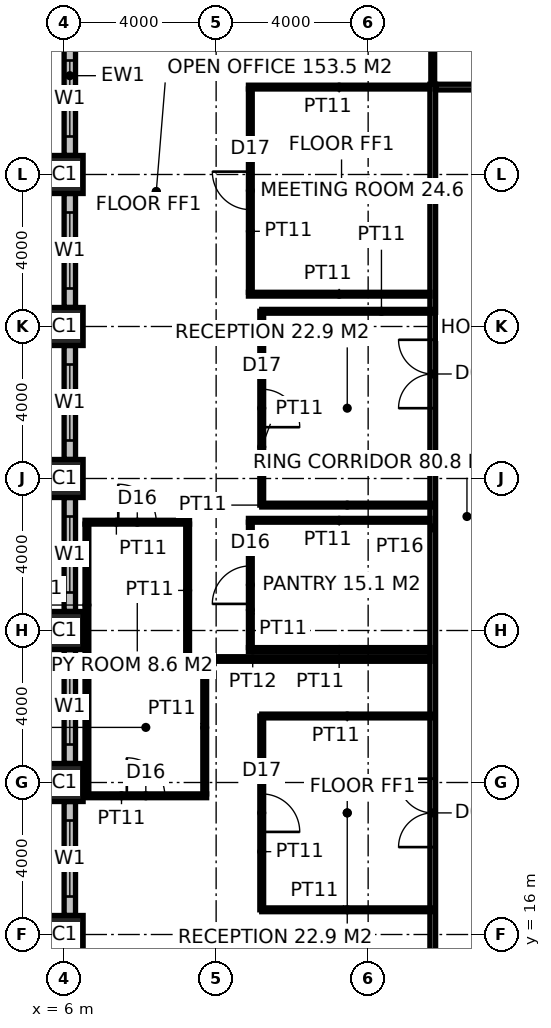
"""IFC4 building model, lengths in metres.
Left out: names, types, materials, properties, quantities, classifications, styles, units other than length and angle.
Written with IfcOpenShell. Run it as: python <this file> out.ifc"""

import sys

from ifc_helpers import new_model, si_unit, direction, frame, frame_2d, origin, origin_2d, place, context, subcontext, project, spatial, rectangle, hollow_rectangle, extrude, element, fill, save


model = new_model("IFC4")
c1 = context("Model", 3, precision=1e-05, world=origin(), true_north=direction((0.0, 1.0)))
c2 = subcontext(c1, "Body", "Model", "MODEL_VIEW")
j1 = project(units=[si_unit("LENGTHUNIT", "METRE"), si_unit("PLANEANGLEUNIT", "RADIAN")], contexts=[c1])
p1 = place(None, origin())
s1 = spatial("IfcSite", under=j1, at=p1, CompositionType="ELEMENT")
p2 = place(p1, origin())
s2 = spatial("IfcBuilding", under=s1, at=p2, CompositionType="ELEMENT")
p3 = place(p2, frame((0.0, 0.0, 286.2)))
s3 = spatial("IfcBuildingStorey", under=s2, at=p3, CompositionType="ELEMENT", Elevation=286.2)
for number, where, z_axis, x_axis in (
    (1, (6.0, 16.0, 0.0), (0.0, 0.0, 1.0), (1.0, 0.0, 0.0)),
    (2, (6.0, 20.0, 0.0), (0.0, 0.0, 1.0), (1.0, 0.0, 0.0)),
    (3, (6.0, 24.0, 0.0), (0.0, 0.0, 1.0), (1.0, 0.0, 0.0)),
    (4, (6.0, 28.0, 0.0), (0.0, 0.0, 1.0), (1.0, 0.0, 0.0)),
    (5, (6.0, 32.0, 0.0), (0.0, 0.0, 1.0), (1.0, 0.0, 0.0)),
    (6, (6.0, 36.0, 0.0), (0.0, 0.0, 1.0), (1.0, 0.0, 0.0)),
):
    element("IfcColumn", number, at=place(p3, frame(where, z_axis=z_axis, x_axis=x_axis)), inside=s3, PredefinedType="COLUMN", context=c2, shape_type="SweptSolid", body=[
        extrude(hollow_rectangle(XDim=1.0, YDim=1.0, WallThickness=0.1, at=origin_2d()), origin(), (0.0, 0.0, 1.0), 4.0),
    ])
p4 = place(p3, frame((15.7, 15.025, 0.0), z_axis=(0.0, 0.0, 1.0), x_axis=(0.0, 1.0, 0.0)))
e7 = element("IfcWall", 7, at=p4, inside=s3, PredefinedType="PARTITIONING", context=c2, shape_type="SweptSolid", body=[
    extrude(rectangle(XDim=23.35, YDim=0.15, at=frame_2d((11.675, 0.0))), origin(), (0.0, 0.0, 1.0), 3.85),
])
p5 = place(p4, frame((3.275, 0.0, 0.0)))
e8 = element("IfcOpeningElement", 8, at=p5, cuts=e7, PredefinedType="OPENING", context=c2, shape_type="SweptSolid", body=[
    extrude(rectangle(XDim=1.8, YDim=2.4, at=frame_2d((0.9, 1.2))), frame((0.0, 0.085, 0.0), z_axis=(0.0, -1.0, 0.0), x_axis=(1.0, 0.0, 0.0)), (0.0, 0.0, 1.0), 0.17),
])
p6 = place(p4, frame((14.825, 0.0, 0.0)))
e9 = element("IfcOpeningElement", 9, at=p6, cuts=e7, PredefinedType="OPENING", context=c2, shape_type="SweptSolid", body=[
    extrude(rectangle(XDim=1.8, YDim=2.4, at=frame_2d((0.9, 1.2))), frame((0.0, 0.085, 0.0), z_axis=(0.0, -1.0, 0.0), x_axis=(1.0, 0.0, 0.0)), (0.0, 0.0, 1.0), 0.17),
])
p7 = place(p3, frame((15.775, 38.3, 0.0), z_axis=(0.0, 0.0, 1.0), x_axis=(1.0, 0.0, 0.0)))
e10 = element("IfcWall", 10, at=p7, inside=s3, PredefinedType="PARTITIONING", context=c2, shape_type="SweptSolid", body=[
    extrude(rectangle(XDim=22.65, YDim=0.15, at=frame_2d((11.325, 0.0))), origin(), (0.0, 0.0, 1.0), 3.85),
])
p8 = place(p7, frame((7.975, 0.0, 0.0)))
e11 = element("IfcOpeningElement", 11, at=p8, cuts=e10, PredefinedType="OPENING", context=c2, shape_type="SweptSolid", body=[
    extrude(rectangle(XDim=0.9, YDim=2.1, at=frame_2d((0.45, 1.05))), frame((0.0, 0.085, 0.0), z_axis=(0.0, -1.0, 0.0), x_axis=(1.0, 0.0, 0.0)), (0.0, 0.0, 1.0), 0.17),
])
p9 = place(p7, frame((11.725, 0.0, 0.0)))
e12 = element("IfcOpeningElement", 12, at=p9, cuts=e10, PredefinedType="OPENING", context=c2, shape_type="SweptSolid", body=[
    extrude(rectangle(XDim=1.0, YDim=2.1, at=frame_2d((0.5, 1.05))), frame((0.0, 0.085, 0.0), z_axis=(0.0, -1.0, 0.0), x_axis=(1.0, 0.0, 0.0)), (0.0, 0.0, 1.0), 0.17),
])
p10 = place(p7, frame((15.575, 0.0, 0.0)))
e13 = element("IfcOpeningElement", 13, at=p10, cuts=e10, PredefinedType="OPENING", context=c2, shape_type="SweptSolid", body=[
    extrude(rectangle(XDim=0.9, YDim=2.1, at=frame_2d((0.45, 1.05))), frame((0.0, 0.085, 0.0), z_axis=(0.0, -1.0, 0.0), x_axis=(1.0, 0.0, 0.0)), (0.0, 0.0, 1.0), 0.17),
])
p11 = place(p3, frame((6.3, 23.25, 0.0), z_axis=(0.0, 0.0, 1.0), x_axis=(1.0, 0.0, 0.0)))
e14 = element("IfcWall", 14, at=p11, inside=s3, PredefinedType="PARTITIONING", context=c2, shape_type="SweptSolid", body=[
    extrude(rectangle(XDim=9.325, YDim=0.12, at=frame_2d((4.663, 0.0))), origin(), (0.0, 0.0, 1.0), 3.85),
])
p12 = place(p3, frame((6.55, 19.65, 0.0), z_axis=(0.0, 0.0, 1.0), x_axis=(1.0, 0.0, 0.0)))
e15 = element("IfcWall", 15, at=p12, inside=s3, PredefinedType="PARTITIONING", context=c2, shape_type="SweptSolid", body=[
    extrude(rectangle(XDim=3.2, YDim=0.1, at=frame_2d((1.6, 0.0))), origin(), (0.0, 0.0, 1.0), 2.85),
])
p13 = place(p12, frame((1.1, 0.0, 0.0)))
e16 = element("IfcOpeningElement", 16, at=p13, cuts=e15, PredefinedType="OPENING", context=c2, shape_type="SweptSolid", body=[
    extrude(rectangle(XDim=1.0, YDim=2.2, at=frame_2d((0.5, 1.1))), frame((0.0, 0.06, 0.0), z_axis=(0.0, -1.0, 0.0), x_axis=(1.0, 0.0, 0.0)), (0.0, 0.0, 1.0), 0.12),
])
p14 = place(p3, frame((10.85, 23.5, 0.0), z_axis=(0.0, 0.0, 1.0), x_axis=(1.0, 0.0, 0.0)))
e17 = element("IfcWall", 17, at=p14, inside=s3, PredefinedType="PARTITIONING", context=c2, shape_type="SweptSolid", body=[
    extrude(rectangle(XDim=4.775, YDim=0.1, at=frame_2d((2.387, 0.0))), origin(), (0.0, 0.0, 1.0), 3.85),
])
p15 = place(p3, frame((6.55, 26.85, 0.0), z_axis=(0.0, 0.0, 1.0), x_axis=(1.0, 0.0, 0.0)))
e18 = element("IfcWall", 18, at=p15, inside=s3, PredefinedType="PARTITIONING", context=c2, shape_type="SweptSolid", body=[
    extrude(rectangle(XDim=2.75, YDim=0.1, at=frame_2d((1.375, 0.0))), origin(), (0.0, 0.0, 1.0), 3.85),
])
p16 = place(p15, frame((0.875, 0.0, 0.0)))
e19 = element("IfcOpeningElement", 19, at=p16, cuts=e18, PredefinedType="OPENING", context=c2, shape_type="SweptSolid", body=[
    extrude(rectangle(XDim=1.0, YDim=2.2, at=frame_2d((0.5, 1.1))), frame((0.0, 0.06, 0.0), z_axis=(0.0, -1.0, 0.0), x_axis=(1.0, 0.0, 0.0)), (0.0, 0.0, 1.0), 0.12),
])
for number, where, z_axis, x_axis in (
    (20, (10.85, 26.9, 0.0), (0.0, 0.0, 1.0), (1.0, 0.0, 0.0)),
    (21, (10.85, 32.85, 0.0), (0.0, 0.0, 1.0), (1.0, 0.0, 0.0)),
    (22, (10.85, 38.3, 0.0), (0.0, 0.0, 1.0), (1.0, 0.0, 0.0)),
):
    element("IfcWall", number, at=place(p3, frame(where, z_axis=z_axis, x_axis=x_axis)), inside=s3, PredefinedType="PARTITIONING", context=c2, shape_type="SweptSolid", body=[
        extrude(rectangle(XDim=4.775, YDim=0.1, at=frame_2d((2.387, 0.0))), origin(), (0.0, 0.0, 1.0), 3.85),
    ])
p17 = place(p3, frame((6.6, 19.7, 0.0), z_axis=(0.0, 0.0, 1.0), x_axis=(0.0, 1.0, 0.0)))
e23 = element("IfcWall", 23, at=p17, inside=s3, PredefinedType="PARTITIONING", context=c2, shape_type="SweptSolid", body=[
    extrude(rectangle(XDim=7.1, YDim=0.1, at=frame_2d((3.55, 0.0))), origin(), (0.0, 0.0, 1.0), 3.85),
])
for number, where, z_axis, x_axis in (
    (24, (9.25, 23.31, 0.0), (0.0, 0.0, 1.0), (0.0, 1.0, 0.0)),
    (25, (9.7, 19.7, 0.0), (0.0, 0.0, 1.0), (0.0, 1.0, 0.0)),
):
    element("IfcWall", number, at=place(p3, frame(where, z_axis=z_axis, x_axis=x_axis)), inside=s3, PredefinedType="PARTITIONING", context=c2, shape_type="SweptSolid", body=[
        extrude(rectangle(XDim=3.49, YDim=0.1, at=frame_2d((1.745, 0.0))), origin(), (0.0, 0.0, 1.0), 3.85),
    ])
p18 = place(p3, frame((10.9, 23.55, 0.0), z_axis=(0.0, 0.0, 1.0), x_axis=(0.0, 1.0, 0.0)))
e26 = element("IfcWall", 26, at=p18, inside=s3, PredefinedType="PARTITIONING", context=c2, shape_type="SweptSolid", body=[
    extrude(rectangle(XDim=3.3, YDim=0.1, at=frame_2d((1.65, 0.0))), origin(), (0.0, 0.0, 1.0), 3.85),
])
p19 = place(p18, frame((1.15, 0.0, 0.0)))
e27 = element("IfcOpeningElement", 27, at=p19, cuts=e26, PredefinedType="OPENING", context=c2, shape_type="SweptSolid", body=[
    extrude(rectangle(XDim=1.0, YDim=2.2, at=frame_2d((0.5, 1.1))), frame((0.0, 0.06, 0.0), z_axis=(0.0, -1.0, 0.0), x_axis=(1.0, 0.0, 0.0)), (0.0, 0.0, 1.0), 0.12),
])
p20 = place(p3, frame((10.9, 32.9, 0.0), z_axis=(0.0, 0.0, 1.0), x_axis=(0.0, 1.0, 0.0)))
e28 = element("IfcWall", 28, at=p20, inside=s3, PredefinedType="PARTITIONING", context=c2, shape_type="SweptSolid", body=[
    extrude(rectangle(XDim=5.35, YDim=0.1, at=frame_2d((2.675, 0.0))), origin(), (0.0, 0.0, 1.0), 3.85),
])
p21 = place(p20, frame((2.175, 0.0, 0.0)))
e29 = element("IfcOpeningElement", 29, at=p21, cuts=e28, PredefinedType="OPENING", context=c2, shape_type="SweptSolid", body=[
    extrude(rectangle(XDim=1.0, YDim=2.2, at=frame_2d((0.5, 1.1))), frame((0.0, 0.06, 0.0), z_axis=(0.0, -1.0, 0.0), x_axis=(1.0, 0.0, 0.0)), (0.0, 0.0, 1.0), 0.12),
])
p22 = place(p3, frame((15.7, 38.375, 0.0), z_axis=(0.0, 0.0, 1.0), x_axis=(0.0, 1.0, 0.0)))
e30 = element("IfcWall", 30, at=p22, inside=s3, PredefinedType="PARTITIONING", context=c2, shape_type="SweptSolid", body=[
    extrude(rectangle(XDim=2.875, YDim=0.1, at=frame_2d((1.438, 0.0))), origin(), (0.0, 0.0, 1.0), 3.85),
])
p23 = place(p3, frame((15.7, 21.75, 0.0), z_axis=(0.0, 0.0, 1.0), x_axis=(-1.0, 0.0, 0.0)))
e31 = element("IfcWall", 31, at=p23, inside=s3, PredefinedType="PARTITIONING", context=c2, shape_type="SweptSolid", body=[
    extrude(rectangle(XDim=4.5, YDim=0.1, at=frame_2d((2.25, 0.0))), origin(), (0.0, 0.0, 1.0), 3.85),
])
p24 = place(p3, frame((11.2, 21.75, 0.0), z_axis=(0.0, 0.0, 1.0), x_axis=(0.0, -1.0, 0.0)))
e32 = element("IfcWall", 32, at=p24, inside=s3, PredefinedType="PARTITIONING", context=c2, shape_type="SweptSolid", body=[
    extrude(rectangle(XDim=5.1, YDim=0.1, at=frame_2d((2.55, 0.0))), origin(), (0.0, 0.0, 1.0), 3.85),
])
p25 = place(p24, frame((2.05, 0.0, 0.0)))
e33 = element("IfcOpeningElement", 33, at=p25, cuts=e32, PredefinedType="OPENING", context=c2, shape_type="SweptSolid", body=[
    extrude(rectangle(XDim=1.0, YDim=2.2, at=frame_2d((0.5, 1.1))), frame((0.0, 0.06, 0.0), z_axis=(0.0, -1.0, 0.0), x_axis=(1.0, 0.0, 0.0)), (0.0, 0.0, 1.0), 0.12),
])
for number, where, z_axis, x_axis in (
    (34, (11.2, 16.65, 0.0), (0.0, 0.0, 1.0), (1.0, 0.0, 0.0)),
    (35, (15.7, 32.4, 0.0), (0.0, 0.0, 1.0), (-1.0, 0.0, 0.0)),
):
    element("IfcWall", number, at=place(p3, frame(where, z_axis=z_axis, x_axis=x_axis)), inside=s3, PredefinedType="PARTITIONING", context=c2, shape_type="SweptSolid", body=[
        extrude(rectangle(XDim=4.5, YDim=0.1, at=frame_2d((2.25, 0.0))), origin(), (0.0, 0.0, 1.0), 3.85),
    ])
p26 = place(p3, frame((11.2, 32.4, 0.0), z_axis=(0.0, 0.0, 1.0), x_axis=(0.0, -1.0, 0.0)))
e36 = element("IfcWall", 36, at=p26, inside=s3, PredefinedType="PARTITIONING", context=c2, shape_type="SweptSolid", body=[
    extrude(rectangle(XDim=5.1, YDim=0.1, at=frame_2d((2.55, 0.0))), origin(), (0.0, 0.0, 1.0), 3.85),
])
p27 = place(p26, frame((2.05, 0.0, 0.0)))
e37 = element("IfcOpeningElement", 37, at=p27, cuts=e36, PredefinedType="OPENING", context=c2, shape_type="SweptSolid", body=[
    extrude(rectangle(XDim=1.0, YDim=2.2, at=frame_2d((0.5, 1.1))), frame((0.0, 0.06, 0.0), z_axis=(0.0, -1.0, 0.0), x_axis=(1.0, 0.0, 0.0)), (0.0, 0.0, 1.0), 0.12),
])
p28 = place(p3, frame((11.2, 27.3, 0.0), z_axis=(0.0, 0.0, 1.0), x_axis=(1.0, 0.0, 0.0)))
e38 = element("IfcWall", 38, at=p28, inside=s3, PredefinedType="PARTITIONING", context=c2, shape_type="SweptSolid", body=[
    extrude(rectangle(XDim=4.5, YDim=0.1, at=frame_2d((2.25, 0.0))), origin(), (0.0, 0.0, 1.0), 3.85),
])
p29 = place(p3, frame((6.15, 19.5, 0.0), z_axis=(0.0, 0.0, 1.0), x_axis=(0.0, -1.0, 0.0)))
e39 = element("IfcWall", 39, at=p29, inside=s3, PredefinedType="ELEMENTEDWALL", context=c2, shape_type="SweptSolid", body=[
    extrude(rectangle(XDim=3.0, YDim=0.3, at=frame_2d((1.5, 0.0))), origin(), (0.0, 0.0, 1.0), 2.85),
])
p30 = place(p29, frame((0.5, 0.0, 0.8)))
e40 = element("IfcOpeningElement", 40, at=p30, cuts=e39, PredefinedType="OPENING", context=c2, shape_type="SweptSolid", body=[
    extrude(rectangle(XDim=2.0, YDim=2.0, at=frame_2d((1.0, 1.0))), frame((0.0, 0.16, 0.0), z_axis=(0.0, -1.0, 0.0), x_axis=(1.0, 0.0, 0.0)), (0.0, 0.0, 1.0), 0.32),
])
p31 = place(p3, frame((6.15, 23.5, 0.0), z_axis=(0.0, 0.0, 1.0), x_axis=(0.0, -1.0, 0.0)))
e41 = element("IfcWall", 41, at=p31, inside=s3, PredefinedType="ELEMENTEDWALL", context=c2, shape_type="SweptSolid", body=[
    extrude(rectangle(XDim=3.0, YDim=0.3, at=frame_2d((1.5, 0.0))), origin(), (0.0, 0.0, 1.0), 2.85),
])
p32 = place(p31, frame((0.5, 0.0, 0.8)))
e42 = element("IfcOpeningElement", 42, at=p32, cuts=e41, PredefinedType="OPENING", context=c2, shape_type="SweptSolid", body=[
    extrude(rectangle(XDim=2.0, YDim=2.0, at=frame_2d((1.0, 1.0))), frame((0.0, 0.16, 0.0), z_axis=(0.0, -1.0, 0.0), x_axis=(1.0, 0.0, 0.0)), (0.0, 0.0, 1.0), 0.32),
])
p33 = place(p3, frame((6.15, 27.5, 0.0), z_axis=(0.0, 0.0, 1.0), x_axis=(0.0, -1.0, 0.0)))
e43 = element("IfcWall", 43, at=p33, inside=s3, PredefinedType="ELEMENTEDWALL", context=c2, shape_type="SweptSolid", body=[
    extrude(rectangle(XDim=3.0, YDim=0.3, at=frame_2d((1.5, 0.0))), origin(), (0.0, 0.0, 1.0), 2.85),
])
p34 = place(p33, frame((0.5, 0.0, 0.8)))
e44 = element("IfcOpeningElement", 44, at=p34, cuts=e43, PredefinedType="OPENING", context=c2, shape_type="SweptSolid", body=[
    extrude(rectangle(XDim=2.0, YDim=2.0, at=frame_2d((1.0, 1.0))), frame((0.0, 0.16, 0.0), z_axis=(0.0, -1.0, 0.0), x_axis=(1.0, 0.0, 0.0)), (0.0, 0.0, 1.0), 0.32),
])
p35 = place(p3, frame((6.15, 31.5, 0.0), z_axis=(0.0, 0.0, 1.0), x_axis=(0.0, -1.0, 0.0)))
e45 = element("IfcWall", 45, at=p35, inside=s3, PredefinedType="ELEMENTEDWALL", context=c2, shape_type="SweptSolid", body=[
    extrude(rectangle(XDim=3.0, YDim=0.3, at=frame_2d((1.5, 0.0))), origin(), (0.0, 0.0, 1.0), 2.85),
])
p36 = place(p35, frame((0.5, 0.0, 0.8)))
e46 = element("IfcOpeningElement", 46, at=p36, cuts=e45, PredefinedType="OPENING", context=c2, shape_type="SweptSolid", body=[
    extrude(rectangle(XDim=2.0, YDim=2.0, at=frame_2d((1.0, 1.0))), frame((0.0, 0.16, 0.0), z_axis=(0.0, -1.0, 0.0), x_axis=(1.0, 0.0, 0.0)), (0.0, 0.0, 1.0), 0.32),
])
p37 = place(p3, frame((6.15, 35.5, 0.0), z_axis=(0.0, 0.0, 1.0), x_axis=(0.0, -1.0, 0.0)))
e47 = element("IfcWall", 47, at=p37, inside=s3, PredefinedType="ELEMENTEDWALL", context=c2, shape_type="SweptSolid", body=[
    extrude(rectangle(XDim=3.0, YDim=0.3, at=frame_2d((1.5, 0.0))), origin(), (0.0, 0.0, 1.0), 2.85),
])
p38 = place(p37, frame((0.5, 0.0, 0.8)))
e48 = element("IfcOpeningElement", 48, at=p38, cuts=e47, PredefinedType="OPENING", context=c2, shape_type="SweptSolid", body=[
    extrude(rectangle(XDim=2.0, YDim=2.0, at=frame_2d((1.0, 1.0))), frame((0.0, 0.16, 0.0), z_axis=(0.0, -1.0, 0.0), x_axis=(1.0, 0.0, 0.0)), (0.0, 0.0, 1.0), 0.32),
])
p39 = place(p3, frame((6.15, 39.5, 0.0), z_axis=(0.0, 0.0, 1.0), x_axis=(0.0, -1.0, 0.0)))
e49 = element("IfcWall", 49, at=p39, inside=s3, PredefinedType="ELEMENTEDWALL", context=c2, shape_type="SweptSolid", body=[
    extrude(rectangle(XDim=3.0, YDim=0.3, at=frame_2d((1.5, 0.0))), origin(), (0.0, 0.0, 1.0), 2.85),
])
p40 = place(p39, frame((0.5, 0.0, 0.8)))
e50 = element("IfcOpeningElement", 50, at=p40, cuts=e49, PredefinedType="OPENING", context=c2, shape_type="SweptSolid", body=[
    extrude(rectangle(XDim=2.0, YDim=2.0, at=frame_2d((1.0, 1.0))), frame((0.0, 0.16, 0.0), z_axis=(0.0, -1.0, 0.0), x_axis=(1.0, 0.0, 0.0)), (0.0, 0.0, 1.0), 0.32),
])
p41 = place(p5, origin())
e51 = element("IfcDoor", 51, at=p41, inside=s3, OperationType="DOUBLE_DOOR_DOUBLE_SWING", PredefinedType="DOOR", context=c2, shape_type="SweptSolid", body=[
    extrude(rectangle(XDim=1.8, YDim=2.4, at=frame_2d((0.9, 1.2))), frame((0.0, 0.025, 0.0), z_axis=(0.0, -1.0, 0.0), x_axis=(1.0, 0.0, 0.0)), (0.0, 0.0, 1.0), 0.05),
])
fill(e8, e51)
p42 = place(p6, origin())
e52 = element("IfcDoor", 52, at=p42, inside=s3, OperationType="DOUBLE_DOOR_DOUBLE_SWING", PredefinedType="DOOR", context=c2, shape_type="SweptSolid", body=[
    extrude(rectangle(XDim=1.8, YDim=2.4, at=frame_2d((0.9, 1.2))), frame((0.0, 0.025, 0.0), z_axis=(0.0, -1.0, 0.0), x_axis=(1.0, 0.0, 0.0)), (0.0, 0.0, 1.0), 0.05),
])
fill(e9, e52)
p43 = place(p21, origin())
e53 = element("IfcDoor", 53, at=p43, inside=s3, OperationType="SINGLE_SWING_RIGHT", PredefinedType="DOOR", context=c2, shape_type="SweptSolid", body=[
    extrude(rectangle(XDim=1.0, YDim=2.2, at=frame_2d((0.5, 1.1))), frame((0.0, 0.025, 0.0), z_axis=(0.0, -1.0, 0.0), x_axis=(1.0, 0.0, 0.0)), (0.0, 0.0, 1.0), 0.05),
])
fill(e29, e53)
p44 = place(p13, origin())
e54 = element("IfcDoor", 54, at=p44, inside=s3, OperationType="SINGLE_SWING_LEFT", PredefinedType="DOOR", context=c2, shape_type="SweptSolid", body=[
    extrude(rectangle(XDim=1.0, YDim=2.2, at=frame_2d((0.5, 1.1))), frame((0.0, 0.025, 0.0), z_axis=(0.0, -1.0, 0.0), x_axis=(1.0, 0.0, 0.0)), (0.0, 0.0, 1.0), 0.05),
])
fill(e16, e54)
p45 = place(p19, origin())
e55 = element("IfcDoor", 55, at=p45, inside=s3, OperationType="SINGLE_SWING_LEFT", PredefinedType="DOOR", context=c2, shape_type="SweptSolid", body=[
    extrude(rectangle(XDim=1.0, YDim=2.2, at=frame_2d((0.5, 1.1))), frame((0.0, 0.025, 0.0), z_axis=(0.0, -1.0, 0.0), x_axis=(1.0, 0.0, 0.0)), (0.0, 0.0, 1.0), 0.05),
])
fill(e27, e55)
p46 = place(p16, origin())
e56 = element("IfcDoor", 56, at=p46, inside=s3, OperationType="SINGLE_SWING_LEFT", PredefinedType="DOOR", context=c2, shape_type="SweptSolid", body=[
    extrude(rectangle(XDim=1.0, YDim=2.2, at=frame_2d((0.5, 1.1))), frame((0.0, 0.025, 0.0), z_axis=(0.0, -1.0, 0.0), x_axis=(1.0, 0.0, 0.0)), (0.0, 0.0, 1.0), 0.05),
])
fill(e19, e56)
p47 = place(p25, origin())
e57 = element("IfcDoor", 57, at=p47, inside=s3, OperationType="SINGLE_SWING_RIGHT", PredefinedType="DOOR", context=c2, shape_type="SweptSolid", body=[
    extrude(rectangle(XDim=1.0, YDim=2.2, at=frame_2d((0.5, 1.1))), frame((0.0, 0.025, 0.0), z_axis=(0.0, -1.0, 0.0), x_axis=(1.0, 0.0, 0.0)), (0.0, 0.0, 1.0), 0.05),
])
fill(e33, e57)
p48 = place(p27, origin())
e58 = element("IfcDoor", 58, at=p48, inside=s3, OperationType="SINGLE_SWING_RIGHT", PredefinedType="DOOR", context=c2, shape_type="SweptSolid", body=[
    extrude(rectangle(XDim=1.0, YDim=2.2, at=frame_2d((0.5, 1.1))), frame((0.0, 0.025, 0.0), z_axis=(0.0, -1.0, 0.0), x_axis=(1.0, 0.0, 0.0)), (0.0, 0.0, 1.0), 0.05),
])
fill(e37, e58)
p49 = place(p30, origin())
e59 = element("IfcWindow", 59, at=p49, inside=s3, PartitioningType="SINGLE_PANEL", PredefinedType="WINDOW", context=c2, shape_type="SweptSolid", body=[
    extrude(rectangle(XDim=2.0, YDim=2.0, at=frame_2d((1.0, 1.0))), frame((0.0, 0.03, 0.0), z_axis=(0.0, -1.0, 0.0), x_axis=(1.0, 0.0, 0.0)), (0.0, 0.0, 1.0), 0.06),
])
fill(e40, e59)
p50 = place(p32, origin())
e60 = element("IfcWindow", 60, at=p50, inside=s3, PartitioningType="SINGLE_PANEL", PredefinedType="WINDOW", context=c2, shape_type="SweptSolid", body=[
    extrude(rectangle(XDim=2.0, YDim=2.0, at=frame_2d((1.0, 1.0))), frame((0.0, 0.03, 0.0), z_axis=(0.0, -1.0, 0.0), x_axis=(1.0, 0.0, 0.0)), (0.0, 0.0, 1.0), 0.06),
])
fill(e42, e60)
p51 = place(p34, origin())
e61 = element("IfcWindow", 61, at=p51, inside=s3, PartitioningType="SINGLE_PANEL", PredefinedType="WINDOW", context=c2, shape_type="SweptSolid", body=[
    extrude(rectangle(XDim=2.0, YDim=2.0, at=frame_2d((1.0, 1.0))), frame((0.0, 0.03, 0.0), z_axis=(0.0, -1.0, 0.0), x_axis=(1.0, 0.0, 0.0)), (0.0, 0.0, 1.0), 0.06),
])
fill(e44, e61)
p52 = place(p36, origin())
e62 = element("IfcWindow", 62, at=p52, inside=s3, PartitioningType="SINGLE_PANEL", PredefinedType="WINDOW", context=c2, shape_type="SweptSolid", body=[
    extrude(rectangle(XDim=2.0, YDim=2.0, at=frame_2d((1.0, 1.0))), frame((0.0, 0.03, 0.0), z_axis=(0.0, -1.0, 0.0), x_axis=(1.0, 0.0, 0.0)), (0.0, 0.0, 1.0), 0.06),
])
fill(e46, e62)
p53 = place(p38, origin())
e63 = element("IfcWindow", 63, at=p53, inside=s3, PartitioningType="SINGLE_PANEL", PredefinedType="WINDOW", context=c2, shape_type="SweptSolid", body=[
    extrude(rectangle(XDim=2.0, YDim=2.0, at=frame_2d((1.0, 1.0))), frame((0.0, 0.03, 0.0), z_axis=(0.0, -1.0, 0.0), x_axis=(1.0, 0.0, 0.0)), (0.0, 0.0, 1.0), 0.06),
])
fill(e48, e63)
p54 = place(p40, origin())
e64 = element("IfcWindow", 64, at=p54, inside=s3, PartitioningType="SINGLE_PANEL", PredefinedType="WINDOW", context=c2, shape_type="SweptSolid", body=[
    extrude(rectangle(XDim=2.0, YDim=2.0, at=frame_2d((1.0, 1.0))), frame((0.0, 0.03, 0.0), z_axis=(0.0, -1.0, 0.0), x_axis=(1.0, 0.0, 0.0)), (0.0, 0.0, 1.0), 0.06),
])
fill(e50, e64)
save(model, sys.argv[1])
